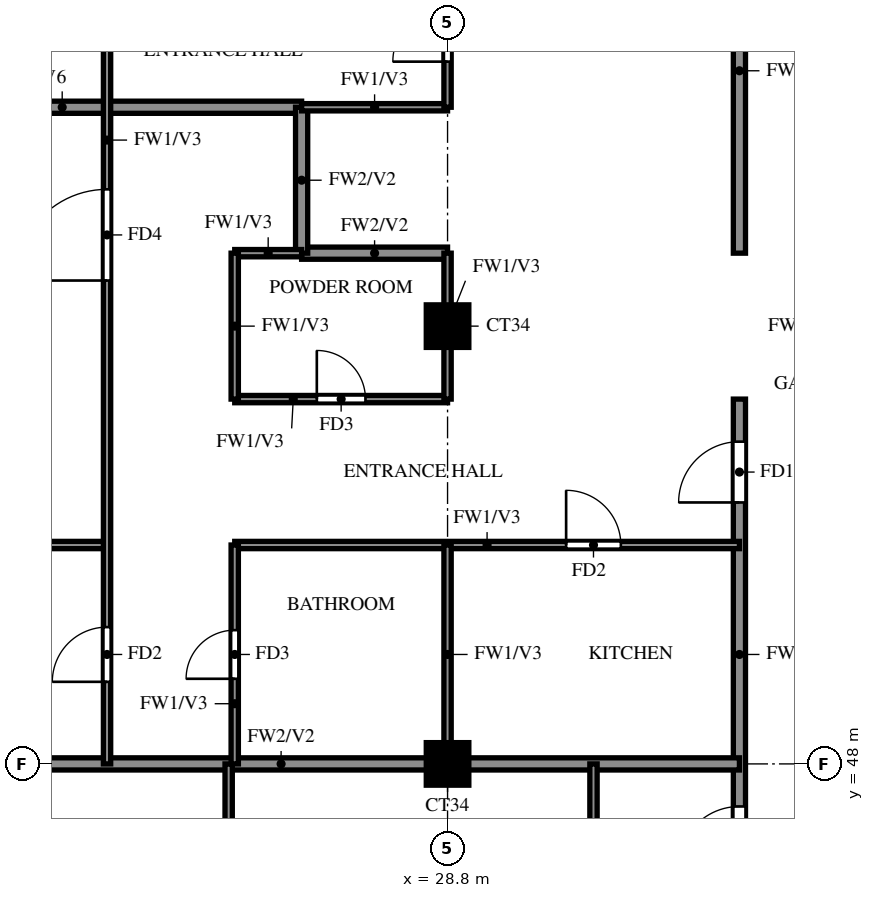
"""IFC4 building model, lengths in metres.
Left out: names, types, materials, properties, quantities, classifications, styles, units other than length and angle.
Written with IfcOpenShell. Run it as: python <this file> out.ifc"""

import sys

from ifc_helpers import new_model, si_unit, direction, frame, frame_2d, origin, origin_2d, place, context, subcontext, project, spatial, rectangle, extrude, source, transform, mapped, element, fill, save


model = new_model("IFC4")
c1 = context("Model", 3, precision=1e-05, world=origin(), true_north=direction((0.0, 1.0)))
c2 = subcontext(c1, "Body", "Model", "MODEL_VIEW")
j1 = project(units=[si_unit("LENGTHUNIT", "METRE"), si_unit("PLANEANGLEUNIT", "RADIAN")], contexts=[c1])
p1 = place(None, origin())
s1 = spatial("IfcSite", under=j1, at=p1, CompositionType="ELEMENT")
p2 = place(p1, origin())
s2 = spatial("IfcBuilding", under=s1, at=p2, CompositionType="ELEMENT")
p3 = place(p2, frame((0.0, 0.0, 260.5)))
s3 = spatial("IfcBuildingStorey", under=s2, at=p3, CompositionType="ELEMENT", Elevation=260.5)
m1 = source(origin(), c2, "Body", "SweptSolid", [
    extrude(rectangle(XDim=0.7, YDim=0.7, at=origin_2d()), origin(), (0.0, 0.0, 1.0), 3.22),
])
for number, where, z_axis, x_axis in (
    (1, (28.8, 48.0, 0.0), (0.0, 0.0, 1.0), (1.0, 0.0, 0.0)),
    (2, (28.8, 55.2, 0.0), (0.0, 0.0, 1.0), (1.0, 0.0, 0.0)),
):
    element("IfcColumn", number, at=place(p3, frame(where, z_axis=z_axis, x_axis=x_axis)), inside=s3, PredefinedType="COLUMN", context=c2, shape_type="MappedRepresentation", body=[
        mapped(m1, transform((0.0, 0.0, 0.0))),
    ])
p4 = place(p3, frame((33.6, 45.6, 0.0), z_axis=(0.0, 0.0, 1.0), x_axis=(0.0, 1.0, 0.0)))
e3 = element("IfcWall", 3, at=p4, inside=s3, PredefinedType="SOLIDWALL", context=c2, shape_type="SweptSolid", body=[
    extrude(rectangle(XDim=8.4, YDim=0.2, at=frame_2d((4.2, 0.0))), origin(), (0.0, 0.0, 1.0), 3.22),
])
p5 = place(p4, frame((0.7, 0.0, 0.0)))
e4 = element("IfcOpeningElement", 4, at=p5, cuts=e3, PredefinedType="OPENING", context=c2, shape_type="SweptSolid", body=[
    extrude(rectangle(XDim=1.0, YDim=2.1, at=frame_2d((0.5, 1.05))), frame((0.0, 0.11, 0.0), z_axis=(0.0, -1.0, 0.0), x_axis=(1.0, 0.0, 0.0)), (0.0, 0.0, 1.0), 0.22),
])
p6 = place(p4, frame((6.7, 0.0, 0.0)))
e5 = element("IfcOpeningElement", 5, at=p6, cuts=e3, PredefinedType="OPENING", context=c2, shape_type="SweptSolid", body=[
    extrude(rectangle(XDim=1.0, YDim=2.1, at=frame_2d((0.5, 1.05))), frame((0.0, 0.11, 0.0), z_axis=(0.0, -1.0, 0.0), x_axis=(1.0, 0.0, 0.0)), (0.0, 0.0, 1.0), 0.22),
])
p7 = place(p3, frame((33.6, 56.4, 0.0), z_axis=(0.0, 0.0, 1.0), x_axis=(0.0, 1.0, 0.0)))
e6 = element("IfcWall", 6, at=p7, inside=s3, PredefinedType="SOLIDWALL", context=c2, shape_type="SweptSolid", body=[
    extrude(rectangle(XDim=6.0, YDim=0.2, at=frame_2d((3.0, 0.0))), origin(), (0.0, 0.0, 1.0), 3.22),
])
p8 = place(p7, frame((3.7, 0.0, 0.0)))
e7 = element("IfcOpeningElement", 7, at=p8, cuts=e6, PredefinedType="OPENING", context=c2, shape_type="SweptSolid", body=[
    extrude(rectangle(XDim=1.0, YDim=2.1, at=frame_2d((0.5, 1.05))), frame((0.0, 0.11, 0.0), z_axis=(0.0, -1.0, 0.0), x_axis=(1.0, 0.0, 0.0)), (0.0, 0.0, 1.0), 0.22),
])
p9 = place(p3, frame((18.525, 48.0, 0.0), z_axis=(0.0, 0.0, 1.0), x_axis=(1.0, 0.0, 0.0)))
e8 = element("IfcWall", 8, at=p9, inside=s3, PredefinedType="SOLIDWALL", context=c2, shape_type="SweptSolid", body=[
    extrude(rectangle(XDim=15.075, YDim=0.2, at=frame_2d((7.538, 0.0))), origin(), (0.0, 0.0, 1.0), 3.22),
])
p10 = place(p3, frame((26.4, 56.4, 0.0), z_axis=(0.0, 0.0, 1.0), x_axis=(1.0, 0.0, 0.0)))
e9 = element("IfcWall", 9, at=p10, inside=s3, PredefinedType="SOLIDWALL", context=c2, shape_type="SweptSolid", body=[
    extrude(rectangle(XDim=2.4, YDim=0.2, at=frame_2d((1.2, 0.0))), origin(), (0.0, 0.0, 1.0), 3.22),
])
p11 = place(p3, frame((18.525, 58.8, 0.0), z_axis=(0.0, 0.0, 1.0), x_axis=(1.0, 0.0, 0.0)))
e10 = element("IfcWall", 10, at=p11, inside=s3, PredefinedType="SOLIDWALL", context=c2, shape_type="SweptSolid", body=[
    extrude(rectangle(XDim=7.875, YDim=0.2, at=frame_2d((3.938, 0.0))), origin(), (0.0, 0.0, 1.0), 2.32),
])
p12 = place(p3, frame((26.4, 56.4, 0.0), z_axis=(0.0, 0.0, 1.0), x_axis=(0.0, 1.0, 0.0)))
e11 = element("IfcWall", 11, at=p12, inside=s3, PredefinedType="SOLIDWALL", context=c2, shape_type="SweptSolid", body=[
    extrude(rectangle(XDim=2.4, YDim=0.2, at=frame_2d((1.2, 0.0))), origin(), (0.0, 0.0, 1.0), 3.22),
])
p13 = place(p3, frame((18.525, 51.6, 0.0), z_axis=(0.0, 0.0, 1.0), x_axis=(1.0, 0.0, 0.0)))
e12 = element("IfcWall", 12, at=p13, inside=s3, PredefinedType="PARTITIONING", context=c2, shape_type="SweptSolid", body=[
    extrude(rectangle(XDim=4.675, YDim=0.12, at=frame_2d((2.337, 0.0))), origin(), (0.0, 0.0, 1.0), 2.32),
])
p14 = place(p3, frame((25.3, 51.6, 0.0), z_axis=(0.0, 0.0, 1.0), x_axis=(1.0, 0.0, 0.0)))
e13 = element("IfcWall", 13, at=p14, inside=s3, PredefinedType="PARTITIONING", context=c2, shape_type="SweptSolid", body=[
    extrude(rectangle(XDim=8.3, YDim=0.12, at=frame_2d((4.15, 0.0))), origin(), (0.0, 0.0, 1.0), 3.22),
])
p15 = place(p14, frame((5.45, 0.0, 0.0)))
e14 = element("IfcOpeningElement", 14, at=p15, cuts=e13, PredefinedType="OPENING", context=c2, shape_type="SweptSolid", body=[
    extrude(rectangle(XDim=0.9, YDim=2.1, at=frame_2d((0.45, 1.05))), frame((0.0, 0.07, 0.0), z_axis=(0.0, -1.0, 0.0), x_axis=(1.0, 0.0, 0.0)), (0.0, 0.0, 1.0), 0.14),
])
p16 = place(p3, frame((25.3, 54.0, 0.0), z_axis=(0.0, 0.0, 1.0), x_axis=(1.0, 0.0, 0.0)))
e15 = element("IfcWall", 15, at=p16, inside=s3, PredefinedType="PARTITIONING", context=c2, shape_type="SweptSolid", body=[
    extrude(rectangle(XDim=3.5, YDim=0.12, at=frame_2d((1.75, 0.0))), origin(), (0.0, 0.0, 1.0), 3.22),
])
p17 = place(p16, frame((1.35, 0.0, 0.0)))
e16 = element("IfcOpeningElement", 16, at=p17, cuts=e15, PredefinedType="OPENING", context=c2, shape_type="SweptSolid", body=[
    extrude(rectangle(XDim=0.8, YDim=2.1, at=frame_2d((0.4, 1.05))), frame((0.0, 0.07, 0.0), z_axis=(0.0, -1.0, 0.0), x_axis=(1.0, 0.0, 0.0)), (0.0, 0.0, 1.0), 0.14),
])
p18 = place(p3, frame((25.3, 56.4, 0.0), z_axis=(0.0, 0.0, 1.0), x_axis=(1.0, 0.0, 0.0)))
e17 = element("IfcWall", 17, at=p18, inside=s3, PredefinedType="PARTITIONING", context=c2, shape_type="SweptSolid", body=[
    extrude(rectangle(XDim=1.1, YDim=0.12, at=frame_2d((0.55, 0.0))), origin(), (0.0, 0.0, 1.0), 3.22),
])
p19 = place(p3, frame((26.4, 58.8, 0.0), z_axis=(0.0, 0.0, 1.0), x_axis=(1.0, 0.0, 0.0)))
e18 = element("IfcWall", 18, at=p19, inside=s3, PredefinedType="PARTITIONING", context=c2, shape_type="SweptSolid", body=[
    extrude(rectangle(XDim=2.4, YDim=0.12, at=frame_2d((1.2, 0.0))), origin(), (0.0, 0.0, 1.0), 3.22),
])
p20 = place(p3, frame((23.2, 48.0, 0.0), z_axis=(0.0, 0.0, 1.0), x_axis=(0.0, 1.0, 0.0)))
e19 = element("IfcWall", 19, at=p20, inside=s3, PredefinedType="PARTITIONING", context=c2, shape_type="SweptSolid", body=[
    extrude(rectangle(XDim=21.6, YDim=0.12, at=frame_2d((10.8, 0.0))), origin(), (0.0, 0.0, 1.0), 3.22),
])
p21 = place(p20, frame((1.35, 0.0, 0.0)))
e20 = element("IfcOpeningElement", 20, at=p21, cuts=e19, PredefinedType="OPENING", context=c2, shape_type="SweptSolid", body=[
    extrude(rectangle(XDim=0.9, YDim=2.1, at=frame_2d((0.45, 1.05))), frame((0.0, 0.07, 0.0), z_axis=(0.0, -1.0, 0.0), x_axis=(1.0, 0.0, 0.0)), (0.0, 0.0, 1.0), 0.14),
])
p22 = place(p20, frame((7.95, 0.0, 0.0)))
e21 = element("IfcOpeningElement", 21, at=p22, cuts=e19, PredefinedType="OPENING", context=c2, shape_type="SweptSolid", body=[
    extrude(rectangle(XDim=1.5, YDim=2.1, at=frame_2d((0.75, 1.05))), frame((0.0, 0.07, 0.0), z_axis=(0.0, -1.0, 0.0), x_axis=(1.0, 0.0, 0.0)), (0.0, 0.0, 1.0), 0.14),
])
p23 = place(p20, frame((12.15, 0.0, 0.0)))
e22 = element("IfcOpeningElement", 22, at=p23, cuts=e19, PredefinedType="OPENING", context=c2, shape_type="SweptSolid", body=[
    extrude(rectangle(XDim=0.9, YDim=2.1, at=frame_2d((0.45, 1.05))), frame((0.0, 0.07, 0.0), z_axis=(0.0, -1.0, 0.0), x_axis=(1.0, 0.0, 0.0)), (0.0, 0.0, 1.0), 0.14),
])
p24 = place(p20, frame((17.55, 0.0, 0.0)))
e23 = element("IfcOpeningElement", 23, at=p24, cuts=e19, PredefinedType="OPENING", context=c2, shape_type="SweptSolid", body=[
    extrude(rectangle(XDim=0.9, YDim=2.1, at=frame_2d((0.45, 1.05))), frame((0.0, 0.07, 0.0), z_axis=(0.0, -1.0, 0.0), x_axis=(1.0, 0.0, 0.0)), (0.0, 0.0, 1.0), 0.14),
])
p25 = place(p3, frame((25.2, 39.725, 0.0), z_axis=(0.0, 0.0, 1.0), x_axis=(0.0, 1.0, 0.0)))
e24 = element("IfcWall", 24, at=p25, inside=s3, PredefinedType="PARTITIONING", context=c2, shape_type="SweptSolid", body=[
    extrude(rectangle(XDim=8.275, YDim=0.12, at=frame_2d((4.137, 0.0))), origin(), (0.0, 0.0, 1.0), 3.22),
])
p26 = place(p25, frame((4.525, 0.0, 0.0)))
e25 = element("IfcOpeningElement", 25, at=p26, cuts=e24, PredefinedType="OPENING", context=c2, shape_type="SweptSolid", body=[
    extrude(rectangle(XDim=0.9, YDim=2.1, at=frame_2d((0.45, 1.05))), frame((0.0, 0.07, 0.0), z_axis=(0.0, -1.0, 0.0), x_axis=(1.0, 0.0, 0.0)), (0.0, 0.0, 1.0), 0.14),
])
p27 = place(p3, frame((25.3, 48.0, 0.0), z_axis=(0.0, 0.0, 1.0), x_axis=(0.0, 1.0, 0.0)))
e26 = element("IfcWall", 26, at=p27, inside=s3, PredefinedType="PARTITIONING", context=c2, shape_type="SweptSolid", body=[
    extrude(rectangle(XDim=3.6, YDim=0.12, at=frame_2d((1.8, 0.0))), origin(), (0.0, 0.0, 1.0), 3.22),
])
p28 = place(p27, frame((1.4, 0.0, 0.0)))
e27 = element("IfcOpeningElement", 27, at=p28, cuts=e26, PredefinedType="OPENING", context=c2, shape_type="SweptSolid", body=[
    extrude(rectangle(XDim=0.8, YDim=2.1, at=frame_2d((0.4, 1.05))), frame((0.0, 0.07, 0.0), z_axis=(0.0, -1.0, 0.0), x_axis=(1.0, 0.0, 0.0)), (0.0, 0.0, 1.0), 0.14),
])
p29 = place(p3, frame((25.3, 54.0, 0.0), z_axis=(0.0, 0.0, 1.0), x_axis=(0.0, 1.0, 0.0)))
e28 = element("IfcWall", 28, at=p29, inside=s3, PredefinedType="PARTITIONING", context=c2, shape_type="SweptSolid", body=[
    extrude(rectangle(XDim=2.4, YDim=0.12, at=frame_2d((1.2, 0.0))), origin(), (0.0, 0.0, 1.0), 3.22),
])
p30 = place(p3, frame((28.8, 48.0, 0.0), z_axis=(0.0, 0.0, 1.0), x_axis=(0.0, 1.0, 0.0)))
e29 = element("IfcWall", 29, at=p30, inside=s3, PredefinedType="PARTITIONING", context=c2, shape_type="SweptSolid", body=[
    extrude(rectangle(XDim=3.6, YDim=0.12, at=frame_2d((1.8, 0.0))), origin(), (0.0, 0.0, 1.0), 3.22),
])
p31 = place(p3, frame((28.8, 54.0, 0.0), z_axis=(0.0, 0.0, 1.0), x_axis=(0.0, 1.0, 0.0)))
e30 = element("IfcWall", 30, at=p31, inside=s3, PredefinedType="PARTITIONING", context=c2, shape_type="SweptSolid", body=[
    extrude(rectangle(XDim=2.4, YDim=0.12, at=frame_2d((1.2, 0.0))), origin(), (0.0, 0.0, 1.0), 3.22),
])
p32 = place(p3, frame((28.8, 58.8, 0.0), z_axis=(0.0, 0.0, 1.0), x_axis=(0.0, 1.0, 0.0)))
e31 = element("IfcWall", 31, at=p32, inside=s3, PredefinedType="PARTITIONING", context=c2, shape_type="SweptSolid", body=[
    extrude(rectangle(XDim=3.6, YDim=0.12, at=frame_2d((1.8, 0.0))), origin(), (0.0, 0.0, 1.0), 3.22),
])
p33 = place(p32, frame((0.75, 0.0, 0.0)))
e32 = element("IfcOpeningElement", 32, at=p33, cuts=e31, PredefinedType="OPENING", context=c2, shape_type="SweptSolid", body=[
    extrude(rectangle(XDim=0.9, YDim=2.1, at=frame_2d((0.45, 1.05))), frame((0.0, 0.07, 0.0), z_axis=(0.0, -1.0, 0.0), x_axis=(1.0, 0.0, 0.0)), (0.0, 0.0, 1.0), 0.14),
])
p34 = place(p3, frame((31.2, 45.6, 0.0), z_axis=(0.0, 0.0, 1.0), x_axis=(0.0, 1.0, 0.0)))
e33 = element("IfcWall", 33, at=p34, inside=s3, PredefinedType="PARTITIONING", context=c2, shape_type="SweptSolid", body=[
    extrude(rectangle(XDim=2.4, YDim=0.12, at=frame_2d((1.2, 0.0))), origin(), (0.0, 0.0, 1.0), 3.22),
])
p35 = place(p5, origin())
e34 = element("IfcDoor", 34, at=p35, inside=s3, OperationType="SINGLE_SWING_LEFT", PredefinedType="DOOR", context=c2, shape_type="SweptSolid", body=[
    extrude(rectangle(XDim=1.0, YDim=2.1, at=frame_2d((0.5, 1.05))), frame((0.0, 0.025, 0.0), z_axis=(0.0, -1.0, 0.0), x_axis=(1.0, 0.0, 0.0)), (0.0, 0.0, 1.0), 0.05),
])
fill(e4, e34)
p36 = place(p6, origin())
e35 = element("IfcDoor", 35, at=p36, inside=s3, OperationType="SINGLE_SWING_LEFT", PredefinedType="DOOR", context=c2, shape_type="SweptSolid", body=[
    extrude(rectangle(XDim=1.0, YDim=2.1, at=frame_2d((0.5, 1.05))), frame((0.0, 0.025, 0.0), z_axis=(0.0, -1.0, 0.0), x_axis=(1.0, 0.0, 0.0)), (0.0, 0.0, 1.0), 0.05),
])
fill(e5, e35)
p37 = place(p21, origin())
e36 = element("IfcDoor", 36, at=p37, inside=s3, OperationType="SINGLE_SWING_LEFT", PredefinedType="DOOR", context=c2, shape_type="SweptSolid", body=[
    extrude(rectangle(XDim=0.9, YDim=2.1, at=frame_2d((0.45, 1.05))), frame((0.0, 0.025, 0.0), z_axis=(0.0, -1.0, 0.0), x_axis=(1.0, 0.0, 0.0)), (0.0, 0.0, 1.0), 0.05),
])
fill(e20, e36)
p38 = place(p22, origin())
e37 = element("IfcDoor", 37, at=p38, inside=s3, OperationType="SINGLE_SWING_LEFT", PredefinedType="DOOR", context=c2, shape_type="SweptSolid", body=[
    extrude(rectangle(XDim=1.5, YDim=2.1, at=frame_2d((0.75, 1.05))), frame((0.0, 0.025, 0.0), z_axis=(0.0, -1.0, 0.0), x_axis=(1.0, 0.0, 0.0)), (0.0, 0.0, 1.0), 0.05),
])
fill(e21, e37)
p39 = place(p28, origin())
e38 = element("IfcDoor", 38, at=p39, inside=s3, OperationType="SINGLE_SWING_LEFT", PredefinedType="DOOR", context=c2, shape_type="SweptSolid", body=[
    extrude(rectangle(XDim=0.8, YDim=2.1, at=frame_2d((0.4, 1.05))), frame((0.0, 0.025, 0.0), z_axis=(0.0, -1.0, 0.0), x_axis=(1.0, 0.0, 0.0)), (0.0, 0.0, 1.0), 0.05),
])
fill(e27, e38)
p40 = place(p17, origin())
e39 = element("IfcDoor", 39, at=p40, inside=s3, OperationType="SINGLE_SWING_LEFT", PredefinedType="DOOR", context=c2, shape_type="SweptSolid", body=[
    extrude(rectangle(XDim=0.8, YDim=2.1, at=frame_2d((0.4, 1.05))), frame((0.0, 0.025, 0.0), z_axis=(0.0, -1.0, 0.0), x_axis=(1.0, 0.0, 0.0)), (0.0, 0.0, 1.0), 0.05),
])
fill(e16, e39)
p41 = place(p15, origin())
e40 = element("IfcDoor", 40, at=p41, inside=s3, OperationType="SINGLE_SWING_RIGHT", PredefinedType="DOOR", context=c2, shape_type="SweptSolid", body=[
    extrude(rectangle(XDim=0.9, YDim=2.1, at=frame_2d((0.45, 1.05))), frame((0.0, 0.025, 0.0), z_axis=(0.0, -1.0, 0.0), x_axis=(1.0, 0.0, 0.0)), (0.0, 0.0, 1.0), 0.05),
])
fill(e14, e40)
p42 = place(p33, origin())
e41 = element("IfcDoor", 41, at=p42, inside=s3, OperationType="SINGLE_SWING_LEFT", PredefinedType="DOOR", context=c2, shape_type="SweptSolid", body=[
    extrude(rectangle(XDim=0.9, YDim=2.1, at=frame_2d((0.45, 1.05))), frame((0.0, 0.025, 0.0), z_axis=(0.0, -1.0, 0.0), x_axis=(1.0, 0.0, 0.0)), (0.0, 0.0, 1.0), 0.05),
])
fill(e32, e41)
save(model, sys.argv[1])
